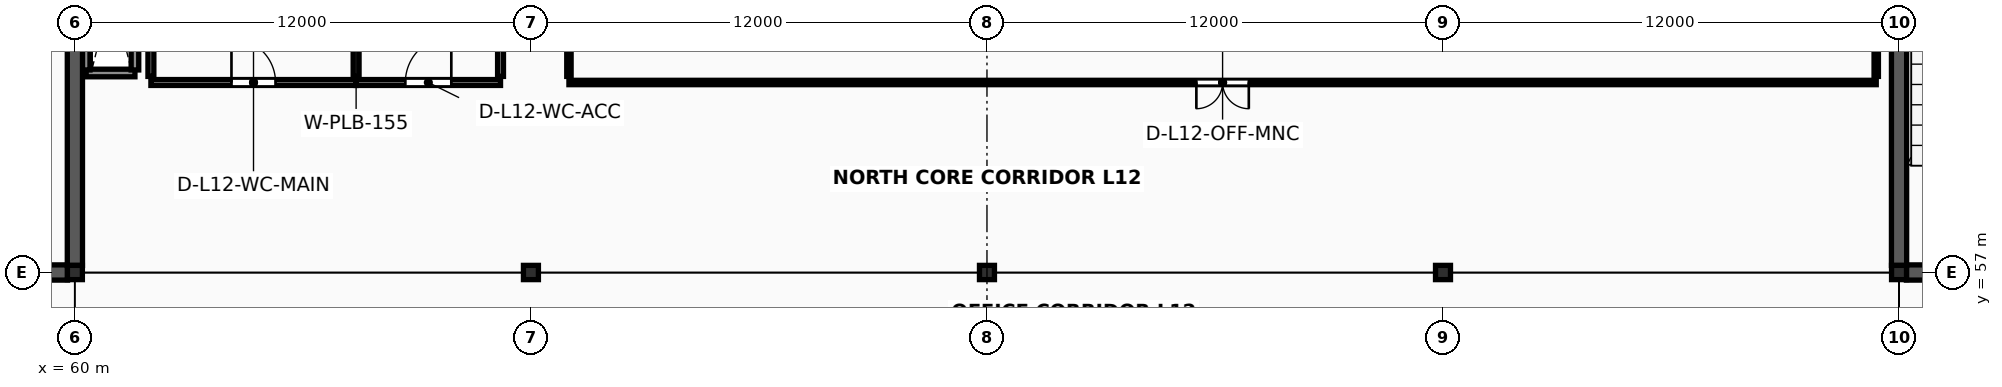
"""IFC4 building model, lengths in metres.
Left out: names, types, materials, properties, quantities, classifications, styles, units other than length and angle.
Written with IfcOpenShell. Run it as: python <this file> out.ifc"""

import sys

from ifc_helpers import new_model, si_unit, direction, frame, frame_2d, origin, origin_2d, place, context, subcontext, project, spatial, rectangle, i_section, extrude, element, fill, save


model = new_model("IFC4")
c1 = context("Model", 3, precision=1e-05, world=origin(), true_north=direction((0.0, 1.0)))
c2 = subcontext(c1, "Body", "Model", "MODEL_VIEW")
j1 = project(units=[si_unit("LENGTHUNIT", "METRE"), si_unit("PLANEANGLEUNIT", "RADIAN")], contexts=[c1])
p1 = place(None, origin())
s1 = spatial("IfcSite", under=j1, at=p1, CompositionType="ELEMENT")
p2 = place(p1, origin())
s2 = spatial("IfcBuilding", under=s1, at=p2, CompositionType="ELEMENT")
p3 = place(p2, frame((0.0, 0.0, 49.6)))
s3 = spatial("IfcBuildingStorey", under=s2, at=p3, CompositionType="ELEMENT", Elevation=49.6)
for number, where, z_axis, x_axis in (
    (1, (60.0, 57.0, 0.0), (0.0, 0.0, 1.0), (1.0, 0.0, 0.0)),
    (2, (72.0, 57.0, 0.0), (0.0, 0.0, 1.0), (1.0, 0.0, 0.0)),
    (3, (84.0, 57.0, 0.0), (0.0, 0.0, 1.0), (1.0, 0.0, 0.0)),
    (4, (96.0, 57.0, 0.0), (0.0, 0.0, 1.0), (1.0, 0.0, 0.0)),
    (5, (108.0, 57.0, 0.0), (0.0, 0.0, 1.0), (1.0, 0.0, 0.0)),
):
    element("IfcColumn", number, at=place(p3, frame(where, z_axis=z_axis, x_axis=x_axis)), inside=s3, PredefinedType="COLUMN", context=c2, shape_type="SweptSolid", body=[
        extrude(i_section(OverallWidth=0.394, OverallDepth=0.375, WebThickness=0.017, FlangeThickness=0.028, FilletRadius=0.018, at=origin_2d()), origin(), (0.0, 0.0, 1.0), 4.0),
    ])
p4 = place(p3, frame((60.297, 62.25, 0.0), z_axis=(0.0, 0.0, 1.0), x_axis=(1.0, 0.0, 0.0)))
e6 = element("IfcWall", 6, at=p4, inside=s3, PredefinedType="SOLIDWALL", context=c2, shape_type="SweptSolid", body=[
    extrude(rectangle(XDim=1.283, YDim=0.2, at=frame_2d((0.642, 0.0))), origin(), (0.0, 0.0, 1.0), 3.848),
])
for number, where, z_axis, x_axis in (
    (7, (60.297, 62.33, 0.0), (0.0, 0.0, 1.0), (0.0, 1.0, 0.0)),
    (8, (61.58, 62.33, 0.0), (0.0, 0.0, 1.0), (0.0, 1.0, 0.0)),
):
    element("IfcWall", number, at=place(p3, frame(where, z_axis=z_axis, x_axis=x_axis)), inside=s3, PredefinedType="SOLIDWALL", context=c2, shape_type="SweptSolid", body=[
        extrude(rectangle(XDim=4.14, YDim=0.2, at=frame_2d((2.07, 0.0))), origin(), (0.0, 0.0, 1.0), 3.848),
    ])
p5 = place(p3, frame((48.194, 57.0, 0.0), z_axis=(0.0, 0.0, 1.0), x_axis=(1.0, 0.0, 0.0)))
e9 = element("IfcWall", 9, at=p5, inside=s3, PredefinedType="SHEAR", context=c2, shape_type="SweptSolid", body=[
    extrude(rectangle(XDim=11.612, YDim=0.4, at=frame_2d((5.806, 0.0))), origin(), (0.0, 0.0, 1.0), 3.848),
])
p6 = place(p5, frame((5.006, 0.0, 0.0)))
e10 = element("IfcOpeningElement", 10, at=p6, cuts=e9, PredefinedType="OPENING", context=c2, shape_type="SweptSolid", body=[
    extrude(rectangle(XDim=1.2, YDim=2.2, at=frame_2d((0.6, 1.1))), frame((0.0, 0.215, 0.0), z_axis=(0.0, -1.0, 0.0), x_axis=(1.0, 0.0, 0.0)), (0.0, 0.0, 1.0), 0.43),
])
p7 = place(p5, frame((8.706, 0.0, 0.0)))
e11 = element("IfcOpeningElement", 11, at=p7, cuts=e9, PredefinedType="OPENING", context=c2, shape_type="SweptSolid", body=[
    extrude(rectangle(XDim=1.5, YDim=2.25, at=frame_2d((0.75, 1.125))), frame((0.0, 0.215, 0.0), z_axis=(0.0, -1.0, 0.0), x_axis=(1.0, 0.0, 0.0)), (0.0, 0.0, 1.0), 0.43),
])
p8 = place(p3, frame((60.0, 57.185, 0.0), z_axis=(0.0, 0.0, 1.0), x_axis=(0.0, 1.0, 0.0)))
e12 = element("IfcWall", 12, at=p8, inside=s3, PredefinedType="SHEAR", context=c2, shape_type="SweptSolid", body=[
    extrude(rectangle(XDim=11.64, YDim=0.4, at=frame_2d((5.82, 0.0))), origin(), (0.0, 0.0, 1.0), 3.848),
])
p9 = place(p3, frame((108.194, 57.0, 0.0), z_axis=(0.0, 0.0, 1.0), x_axis=(1.0, 0.0, 0.0)))
e13 = element("IfcWall", 13, at=p9, inside=s3, PredefinedType="SHEAR", context=c2, shape_type="SweptSolid", body=[
    extrude(rectangle(XDim=11.612, YDim=0.4, at=frame_2d((5.806, 0.0))), origin(), (0.0, 0.0, 1.0), 3.848),
])
p10 = place(p9, frame((5.006, 0.0, 0.0)))
e14 = element("IfcOpeningElement", 14, at=p10, cuts=e13, PredefinedType="OPENING", context=c2, shape_type="SweptSolid", body=[
    extrude(rectangle(XDim=1.2, YDim=2.2, at=frame_2d((0.6, 1.1))), frame((0.0, 0.215, 0.0), z_axis=(0.0, -1.0, 0.0), x_axis=(1.0, 0.0, 0.0)), (0.0, 0.0, 1.0), 0.43),
])
p11 = place(p9, frame((8.706, 0.0, 0.0)))
e15 = element("IfcOpeningElement", 15, at=p11, cuts=e13, PredefinedType="OPENING", context=c2, shape_type="SweptSolid", body=[
    extrude(rectangle(XDim=1.5, YDim=2.25, at=frame_2d((0.75, 1.125))), frame((0.0, 0.215, 0.0), z_axis=(0.0, -1.0, 0.0), x_axis=(1.0, 0.0, 0.0)), (0.0, 0.0, 1.0), 0.43),
])
p12 = place(p3, frame((108.0, 57.185, 0.0), z_axis=(0.0, 0.0, 1.0), x_axis=(0.0, 1.0, 0.0)))
e16 = element("IfcWall", 16, at=p12, inside=s3, PredefinedType="SHEAR", context=c2, shape_type="SweptSolid", body=[
    extrude(rectangle(XDim=11.64, YDim=0.4, at=frame_2d((5.82, 0.0))), origin(), (0.0, 0.0, 1.0), 3.848),
])
p13 = place(p3, frame((62.0, 62.0, 0.0), z_axis=(0.0, 0.0, 1.0), x_axis=(1.0, 0.0, 0.0)))
e17 = element("IfcWall", 17, at=p13, inside=s3, PredefinedType="PLUMBINGWALL", context=c2, shape_type="SweptSolid", body=[
    extrude(rectangle(XDim=5.4, YDim=0.155, at=frame_2d((2.7, 0.0))), origin(), (0.0, 0.0, 1.0), 2.88),
])
p14 = place(p13, frame((2.12, 0.0, 0.0)))
e18 = element("IfcOpeningElement", 18, at=p14, cuts=e17, PredefinedType="OPENING", context=c2, shape_type="SweptSolid", body=[
    extrude(rectangle(XDim=1.16, YDim=2.23, at=frame_2d((0.58, 1.115))), frame((0.0, 0.093, 0.0), z_axis=(0.0, -1.0, 0.0), x_axis=(1.0, 0.0, 0.0)), (0.0, 0.0, 1.0), 0.185),
])
for number, where, z_axis, x_axis in (
    (19, (62.0, 62.16, 0.0), (0.0, 0.0, 1.0), (0.0, 1.0, 0.0)),
    (20, (67.4, 62.16, 0.0), (0.0, 0.0, 1.0), (0.0, 1.0, 0.0)),
):
    element("IfcWall", number, at=place(p3, frame(where, z_axis=z_axis, x_axis=x_axis)), inside=s3, PredefinedType="PLUMBINGWALL", context=c2, shape_type="SweptSolid", body=[
        extrude(rectangle(XDim=4.48, YDim=0.155, at=frame_2d((2.24, 0.0))), origin(), (0.0, 0.0, 1.0), 2.88),
    ])
p15 = place(p3, frame((67.4, 62.0, 0.0), z_axis=(0.0, 0.0, 1.0), x_axis=(1.0, 0.0, 0.0)))
e21 = element("IfcWall", 21, at=p15, inside=s3, PredefinedType="PLUMBINGWALL", context=c2, shape_type="SweptSolid", body=[
    extrude(rectangle(XDim=3.8, YDim=0.155, at=frame_2d((1.9, 0.0))), origin(), (0.0, 0.0, 1.0), 2.88),
])
p16 = place(p15, frame((1.295, 0.0, 0.0)))
e22 = element("IfcOpeningElement", 22, at=p16, cuts=e21, PredefinedType="OPENING", context=c2, shape_type="SweptSolid", body=[
    extrude(rectangle(XDim=1.21, YDim=2.25, at=frame_2d((0.605, 1.125))), frame((0.0, 0.093, 0.0), z_axis=(0.0, -1.0, 0.0), x_axis=(1.0, 0.0, 0.0)), (0.0, 0.0, 1.0), 0.185),
])
p17 = place(p3, frame((71.2, 62.16, 0.0), z_axis=(0.0, 0.0, 1.0), x_axis=(0.0, 1.0, 0.0)))
e23 = element("IfcWall", 23, at=p17, inside=s3, PredefinedType="PLUMBINGWALL", context=c2, shape_type="SweptSolid", body=[
    extrude(rectangle(XDim=4.48, YDim=0.155, at=frame_2d((2.24, 0.0))), origin(), (0.0, 0.0, 1.0), 2.88),
])
p18 = place(p3, frame((73.0, 62.0, 0.0), z_axis=(0.0, 0.0, 1.0), x_axis=(1.0, 0.0, 0.0)))
e24 = element("IfcWall", 24, at=p18, inside=s3, PredefinedType="PARTITIONING", context=c2, shape_type="SweptSolid", body=[
    extrude(rectangle(XDim=34.4, YDim=0.115, at=frame_2d((17.2, 0.0))), origin(), (0.0, 0.0, 1.0), 2.88),
])
p19 = place(p18, frame((16.51, 0.0, 0.0)))
e25 = element("IfcOpeningElement", 25, at=p19, cuts=e24, PredefinedType="OPENING", context=c2, shape_type="SweptSolid", body=[
    extrude(rectangle(XDim=1.38, YDim=2.23, at=frame_2d((0.69, 1.115))), frame((0.0, 0.073, 0.0), z_axis=(0.0, -1.0, 0.0), x_axis=(1.0, 0.0, 0.0)), (0.0, 0.0, 1.0), 0.145),
])
for number, where, z_axis, x_axis in (
    (26, (73.0, 62.16, 0.0), (0.0, 0.0, 1.0), (0.0, 1.0, 0.0)),
    (27, (107.4, 62.16, 0.0), (0.0, 0.0, 1.0), (0.0, 1.0, 0.0)),
):
    element("IfcWall", number, at=place(p3, frame(where, z_axis=z_axis, x_axis=x_axis)), inside=s3, PredefinedType="PARTITIONING", context=c2, shape_type="SweptSolid", body=[
        extrude(rectangle(XDim=6.7, YDim=0.115, at=frame_2d((3.35, 0.0))), origin(), (0.0, 0.0, 1.0), 2.88),
    ])
p20 = place(p14, origin())
e28 = element("IfcDoor", 28, at=p20, inside=s3, OperationType="SINGLE_SWING_LEFT", PredefinedType="DOOR", context=c2, shape_type="SweptSolid", body=[
    extrude(rectangle(XDim=1.16, YDim=2.23, at=frame_2d((0.58, 1.115))), frame((0.0, 0.025, 0.0), z_axis=(0.0, -1.0, 0.0), x_axis=(1.0, 0.0, 0.0)), (0.0, 0.0, 1.0), 0.05),
])
fill(e18, e28)
p21 = place(p16, origin())
e29 = element("IfcDoor", 29, at=p21, inside=s3, OperationType="SINGLE_SWING_RIGHT", PredefinedType="DOOR", context=c2, shape_type="SweptSolid", body=[
    extrude(rectangle(XDim=1.21, YDim=2.25, at=frame_2d((0.605, 1.125))), frame((0.0, 0.025, 0.0), z_axis=(0.0, -1.0, 0.0), x_axis=(1.0, 0.0, 0.0)), (0.0, 0.0, 1.0), 0.05),
])
fill(e22, e29)
p22 = place(p19, origin())
e30 = element("IfcDoor", 30, at=p22, inside=s3, OperationType="DOUBLE_DOOR_SINGLE_SWING", PredefinedType="DOOR", context=c2, shape_type="SweptSolid", body=[
    extrude(rectangle(XDim=1.38, YDim=2.23, at=frame_2d((0.69, 1.115))), frame((0.0, 0.025, 0.0), z_axis=(0.0, -1.0, 0.0), x_axis=(1.0, 0.0, 0.0)), (0.0, 0.0, 1.0), 0.05),
])
fill(e25, e30)
save(model, sys.argv[1])
